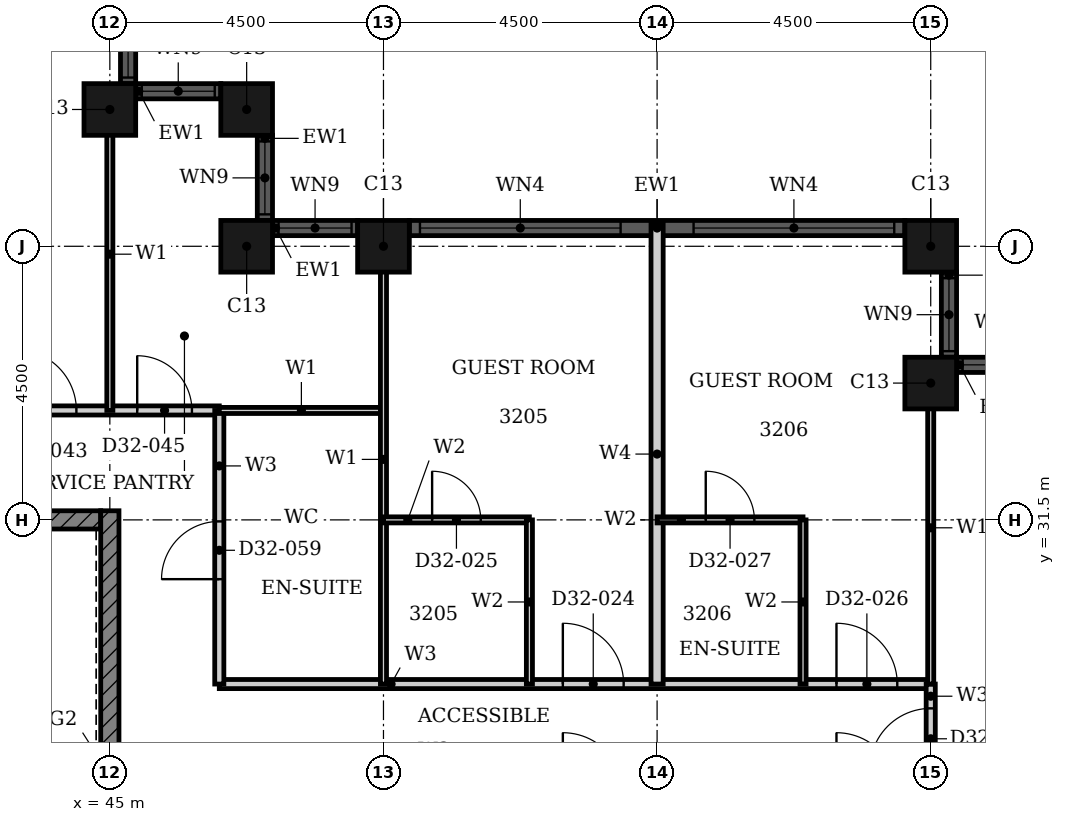
"""IFC4 building model, lengths in metres.
Left out: names, types, materials, properties, quantities, classifications, styles, units other than length and angle.
Written with IfcOpenShell. Run it as: python <this file> out.ifc"""

import sys

from ifc_helpers import new_model, si_unit, direction, frame, frame_2d, origin, origin_2d, place, context, subcontext, project, spatial, rectangle, hollow_rectangle, extrude, element, fill, save


model = new_model("IFC4")
c1 = context("Model", 3, precision=1e-05, world=origin(), true_north=direction((0.0, 1.0)))
c2 = subcontext(c1, "Body", "Model", "MODEL_VIEW")
j1 = project(units=[si_unit("LENGTHUNIT", "METRE"), si_unit("PLANEANGLEUNIT", "RADIAN")], contexts=[c1])
p1 = place(None, origin())
s1 = spatial("IfcSite", under=j1, at=p1, CompositionType="ELEMENT")
p2 = place(p1, origin())
s2 = spatial("IfcBuilding", under=s1, at=p2, CompositionType="ELEMENT")
p3 = place(p2, frame((0.0, 0.0, 129.6)))
s3 = spatial("IfcBuildingStorey", under=s2, at=p3, CompositionType="ELEMENT", Elevation=129.6)
for number, where, z_axis, x_axis in (
    (1, (58.5, 33.75, 0.0), (0.0, 0.0, 1.0), (1.0, 0.0, 0.0)),
    (2, (58.5, 36.0, 0.0), (0.0, 0.0, 1.0), (1.0, 0.0, 0.0)),
    (3, (49.5, 36.0, 0.0), (0.0, 0.0, 1.0), (1.0, 0.0, 0.0)),
    (4, (47.25, 36.0, 0.0), (0.0, 0.0, 1.0), (1.0, 0.0, 0.0)),
    (5, (47.25, 38.25, 0.0), (0.0, 0.0, 1.0), (1.0, 0.0, 0.0)),
    (6, (45.0, 38.25, 0.0), (0.0, 0.0, 1.0), (1.0, 0.0, 0.0)),
):
    element("IfcColumn", number, at=place(p3, frame(where, z_axis=z_axis, x_axis=x_axis)), inside=s3, PredefinedType="COLUMN", context=c2, shape_type="SweptSolid", body=[
        extrude(hollow_rectangle(XDim=0.85, YDim=0.85, WallThickness=0.026, at=origin_2d()), origin(), (0.0, 0.0, 1.0), 3.6),
    ])
p4 = place(p3, frame((60.325, 34.05, 0.0), z_axis=(0.0, 0.0, 1.0), x_axis=(-1.0, 0.0, 0.0)))
e7 = element("IfcWall", 7, at=p4, inside=s3, PredefinedType="SOLIDWALL", context=c2, shape_type="SweptSolid", body=[
    extrude(rectangle(XDim=1.4, YDim=0.25, at=frame_2d((0.7, 0.0))), origin(), (0.0, 0.0, 1.0), 3.6),
])
p5 = place(p4, frame((0.1, 0.0, 0.9)))
e8 = element("IfcOpeningElement", 8, at=p5, cuts=e7, PredefinedType="OPENING", context=c2, shape_type="SweptSolid", body=[
    extrude(rectangle(XDim=1.2, YDim=2.08, at=frame_2d((0.6, 1.04))), frame((0.0, 0.135, 0.0), z_axis=(0.0, -1.0, 0.0), x_axis=(1.0, 0.0, 0.0)), (0.0, 0.0, 1.0), 0.27),
])
p6 = place(p3, frame((58.8, 34.175, 0.0), z_axis=(0.0, 0.0, 1.0), x_axis=(0.0, 1.0, 0.0)))
e9 = element("IfcWall", 9, at=p6, inside=s3, PredefinedType="SOLIDWALL", context=c2, shape_type="SweptSolid", body=[
    extrude(rectangle(XDim=1.4, YDim=0.25, at=frame_2d((0.7, 0.0))), origin(), (0.0, 0.0, 1.0), 3.6),
])
p7 = place(p6, frame((0.1, 0.0, 0.9)))
e10 = element("IfcOpeningElement", 10, at=p7, cuts=e9, PredefinedType="OPENING", context=c2, shape_type="SweptSolid", body=[
    extrude(rectangle(XDim=1.2, YDim=2.08, at=frame_2d((0.6, 1.04))), frame((0.0, 0.135, 0.0), z_axis=(0.0, -1.0, 0.0), x_axis=(1.0, 0.0, 0.0)), (0.0, 0.0, 1.0), 0.27),
])
p8 = place(p3, frame((58.075, 36.3, 0.0), z_axis=(0.0, 0.0, 1.0), x_axis=(-1.0, 0.0, 0.0)))
e11 = element("IfcWall", 11, at=p8, inside=s3, PredefinedType="SOLIDWALL", context=c2, shape_type="SweptSolid", body=[
    extrude(rectangle(XDim=8.15, YDim=0.25, at=frame_2d((4.075, 0.0))), origin(), (0.0, 0.0, 1.0), 3.6),
])
p9 = place(p8, frame((0.175, 0.0, 0.9)))
e12 = element("IfcOpeningElement", 12, at=p9, cuts=e11, PredefinedType="OPENING", context=c2, shape_type="SweptSolid", body=[
    extrude(rectangle(XDim=3.3, YDim=2.08, at=frame_2d((1.65, 1.04))), frame((0.0, 0.135, 0.0), z_axis=(0.0, -1.0, 0.0), x_axis=(1.0, 0.0, 0.0)), (0.0, 0.0, 1.0), 0.27),
])
p10 = place(p8, frame((4.675, 0.0, 0.9)))
e13 = element("IfcOpeningElement", 13, at=p10, cuts=e11, PredefinedType="OPENING", context=c2, shape_type="SweptSolid", body=[
    extrude(rectangle(XDim=3.3, YDim=2.08, at=frame_2d((1.65, 1.04))), frame((0.0, 0.135, 0.0), z_axis=(0.0, -1.0, 0.0), x_axis=(1.0, 0.0, 0.0)), (0.0, 0.0, 1.0), 0.27),
])
p11 = place(p3, frame((49.075, 36.3, 0.0), z_axis=(0.0, 0.0, 1.0), x_axis=(-1.0, 0.0, 0.0)))
e14 = element("IfcWall", 14, at=p11, inside=s3, PredefinedType="SOLIDWALL", context=c2, shape_type="SweptSolid", body=[
    extrude(rectangle(XDim=1.4, YDim=0.25, at=frame_2d((0.7, 0.0))), origin(), (0.0, 0.0, 1.0), 3.6),
])
p12 = place(p11, frame((0.1, 0.0, 0.9)))
e15 = element("IfcOpeningElement", 15, at=p12, cuts=e14, PredefinedType="OPENING", context=c2, shape_type="SweptSolid", body=[
    extrude(rectangle(XDim=1.2, YDim=2.08, at=frame_2d((0.6, 1.04))), frame((0.0, 0.135, 0.0), z_axis=(0.0, -1.0, 0.0), x_axis=(1.0, 0.0, 0.0)), (0.0, 0.0, 1.0), 0.27),
])
p13 = place(p3, frame((47.55, 36.425, 0.0), z_axis=(0.0, 0.0, 1.0), x_axis=(0.0, 1.0, 0.0)))
e16 = element("IfcWall", 16, at=p13, inside=s3, PredefinedType="SOLIDWALL", context=c2, shape_type="SweptSolid", body=[
    extrude(rectangle(XDim=1.4, YDim=0.25, at=frame_2d((0.7, 0.0))), origin(), (0.0, 0.0, 1.0), 3.6),
])
p14 = place(p13, frame((0.1, 0.0, 0.9)))
e17 = element("IfcOpeningElement", 17, at=p14, cuts=e16, PredefinedType="OPENING", context=c2, shape_type="SweptSolid", body=[
    extrude(rectangle(XDim=1.2, YDim=2.08, at=frame_2d((0.6, 1.04))), frame((0.0, 0.135, 0.0), z_axis=(0.0, -1.0, 0.0), x_axis=(1.0, 0.0, 0.0)), (0.0, 0.0, 1.0), 0.27),
])
p15 = place(p3, frame((46.825, 38.55, 0.0), z_axis=(0.0, 0.0, 1.0), x_axis=(-1.0, 0.0, 0.0)))
e18 = element("IfcWall", 18, at=p15, inside=s3, PredefinedType="SOLIDWALL", context=c2, shape_type="SweptSolid", body=[
    extrude(rectangle(XDim=1.4, YDim=0.25, at=frame_2d((0.7, 0.0))), origin(), (0.0, 0.0, 1.0), 3.6),
])
p16 = place(p15, frame((0.1, 0.0, 0.9)))
e19 = element("IfcOpeningElement", 19, at=p16, cuts=e18, PredefinedType="OPENING", context=c2, shape_type="SweptSolid", body=[
    extrude(rectangle(XDim=1.2, YDim=2.08, at=frame_2d((0.6, 1.04))), frame((0.0, 0.135, 0.0), z_axis=(0.0, -1.0, 0.0), x_axis=(1.0, 0.0, 0.0)), (0.0, 0.0, 1.0), 0.27),
])
p17 = place(p3, frame((45.3, 38.675, 0.0), z_axis=(0.0, 0.0, 1.0), x_axis=(0.0, 1.0, 0.0)))
e20 = element("IfcWall", 20, at=p17, inside=s3, PredefinedType="SOLIDWALL", context=c2, shape_type="SweptSolid", body=[
    extrude(rectangle(XDim=1.4, YDim=0.25, at=frame_2d((0.7, 0.0))), origin(), (0.0, 0.0, 1.0), 3.6),
])
p18 = place(p17, frame((0.1, 0.0, 0.9)))
e21 = element("IfcOpeningElement", 21, at=p18, cuts=e20, PredefinedType="OPENING", context=c2, shape_type="SweptSolid", body=[
    extrude(rectangle(XDim=1.2, YDim=2.08, at=frame_2d((0.6, 1.04))), frame((0.0, 0.135, 0.0), z_axis=(0.0, -1.0, 0.0), x_axis=(1.0, 0.0, 0.0)), (0.0, 0.0, 1.0), 0.27),
])
p19 = place(p3, frame((40.625, 31.5, 0.0), z_axis=(0.0, 0.0, 1.0), x_axis=(1.0, 0.0, 0.0)))
e22 = element("IfcWall", 22, at=p19, inside=s3, PredefinedType="SHEAR", context=c2, shape_type="SweptSolid", body=[
    extrude(rectangle(XDim=4.225, YDim=0.3, at=frame_2d((2.113, 0.0))), origin(), (0.0, 0.0, 1.0), 3.3),
])
p20 = place(p3, frame((45.0, 22.35, 0.0), z_axis=(0.0, 0.0, 1.0), x_axis=(0.0, 1.0, 0.0)))
e23 = element("IfcWall", 23, at=p20, inside=s3, PredefinedType="SHEAR", context=c2, shape_type="SweptSolid", body=[
    extrude(rectangle(XDim=9.3, YDim=0.3, at=frame_2d((4.65, 0.0))), origin(), (0.0, 0.0, 1.0), 3.3),
])
p21 = place(p3, frame((46.8, 28.8, 0.0), z_axis=(0.0, 0.0, 1.0), x_axis=(1.0, 0.0, 0.0)))
e24 = element("IfcWall", 24, at=p21, inside=s3, PredefinedType="PARTITIONING", context=c2, shape_type="SweptSolid", body=[
    extrude(rectangle(XDim=11.7, YDim=0.15, at=frame_2d((5.85, 0.0))), origin(), (0.0, 0.0, 1.0), 3.3),
])
p22 = place(p21, frame((5.65, 0.0, 0.0)))
e25 = element("IfcOpeningElement", 25, at=p22, cuts=e24, PredefinedType="OPENING", context=c2, shape_type="SweptSolid", body=[
    extrude(rectangle(XDim=1.0, YDim=2.1, at=frame_2d((0.5, 1.05))), frame((0.0, 0.085, 0.0), z_axis=(0.0, -1.0, 0.0), x_axis=(1.0, 0.0, 0.0)), (0.0, 0.0, 1.0), 0.17),
])
p23 = place(p21, frame((10.15, 0.0, 0.0)))
e26 = element("IfcOpeningElement", 26, at=p23, cuts=e24, PredefinedType="OPENING", context=c2, shape_type="SweptSolid", body=[
    extrude(rectangle(XDim=1.0, YDim=2.1, at=frame_2d((0.5, 1.05))), frame((0.0, 0.085, 0.0), z_axis=(0.0, -1.0, 0.0), x_axis=(1.0, 0.0, 0.0)), (0.0, 0.0, 1.0), 0.17),
])
p24 = place(p3, frame((40.5, 33.3, 0.0), z_axis=(0.0, 0.0, 1.0), x_axis=(1.0, 0.0, 0.0)))
e27 = element("IfcWall", 27, at=p24, inside=s3, PredefinedType="PARTITIONING", context=c2, shape_type="SweptSolid", body=[
    extrude(rectangle(XDim=6.3, YDim=0.15, at=frame_2d((3.15, 0.0))), origin(), (0.0, 0.0, 1.0), 3.3),
])
p25 = place(p24, frame((2.95, 0.0, 0.0)))
e28 = element("IfcOpeningElement", 28, at=p25, cuts=e27, PredefinedType="OPENING", context=c2, shape_type="SweptSolid", body=[
    extrude(rectangle(XDim=1.0, YDim=2.1, at=frame_2d((0.5, 1.05))), frame((0.0, 0.085, 0.0), z_axis=(0.0, -1.0, 0.0), x_axis=(1.0, 0.0, 0.0)), (0.0, 0.0, 1.0), 0.17),
])
p26 = place(p24, frame((4.95, 0.0, 0.0)))
e29 = element("IfcOpeningElement", 29, at=p26, cuts=e27, PredefinedType="OPENING", context=c2, shape_type="SweptSolid", body=[
    extrude(rectangle(XDim=0.9, YDim=2.1, at=frame_2d((0.45, 1.05))), frame((0.0, 0.085, 0.0), z_axis=(0.0, -1.0, 0.0), x_axis=(1.0, 0.0, 0.0)), (0.0, 0.0, 1.0), 0.17),
])
p27 = place(p3, frame((46.8, 28.8, 0.0), z_axis=(0.0, 0.0, 1.0), x_axis=(0.0, 1.0, 0.0)))
e30 = element("IfcWall", 30, at=p27, inside=s3, PredefinedType="PARTITIONING", context=c2, shape_type="SweptSolid", body=[
    extrude(rectangle(XDim=4.5, YDim=0.15, at=frame_2d((2.25, 0.0))), origin(), (0.0, 0.0, 1.0), 3.3),
])
p28 = place(p27, frame((1.725, 0.0, 0.0)))
e31 = element("IfcOpeningElement", 31, at=p28, cuts=e30, PredefinedType="OPENING", context=c2, shape_type="SweptSolid", body=[
    extrude(rectangle(XDim=0.95, YDim=2.1, at=frame_2d((0.475, 1.05))), frame((0.0, 0.085, 0.0), z_axis=(0.0, -1.0, 0.0), x_axis=(1.0, 0.0, 0.0)), (0.0, 0.0, 1.0), 0.17),
])
p29 = place(p3, frame((58.5, 27.0, 0.0), z_axis=(0.0, 0.0, 1.0), x_axis=(0.0, 1.0, 0.0)))
e32 = element("IfcWall", 32, at=p29, inside=s3, PredefinedType="PARTITIONING", context=c2, shape_type="SweptSolid", body=[
    extrude(rectangle(XDim=1.8, YDim=0.15, at=frame_2d((0.9, 0.0))), origin(), (0.0, 0.0, 1.0), 3.3),
])
p30 = place(p29, frame((0.4, 0.0, 0.0)))
e33 = element("IfcOpeningElement", 33, at=p30, cuts=e32, PredefinedType="OPENING", context=c2, shape_type="SweptSolid", body=[
    extrude(rectangle(XDim=1.0, YDim=2.1, at=frame_2d((0.5, 1.05))), frame((0.0, 0.085, 0.0), z_axis=(0.0, -1.0, 0.0), x_axis=(1.0, 0.0, 0.0)), (0.0, 0.0, 1.0), 0.17),
])
p31 = place(p3, frame((46.8, 33.3, 0.0), z_axis=(0.0, 0.0, 1.0), x_axis=(1.0, 0.0, 0.0)))
e34 = element("IfcWall", 34, at=p31, inside=s3, PredefinedType="PARTITIONING", context=c2, shape_type="SweptSolid", body=[
    extrude(rectangle(XDim=2.7, YDim=0.1, at=frame_2d((1.35, 0.0))), origin(), (0.0, 0.0, 1.0), 3.3),
])
p32 = place(p3, frame((45.0, 33.3, 0.0), z_axis=(0.0, 0.0, 1.0), x_axis=(0.0, 1.0, 0.0)))
e35 = element("IfcWall", 35, at=p32, inside=s3, PredefinedType="PARTITIONING", context=c2, shape_type="SweptSolid", body=[
    extrude(rectangle(XDim=5.14, YDim=0.1, at=frame_2d((2.57, 0.0))), origin(), (0.0, 0.0, 1.0), 3.3),
])
p33 = place(p3, frame((49.5, 28.8, 0.0), z_axis=(0.0, 0.0, 1.0), x_axis=(0.0, 1.0, 0.0)))
e36 = element("IfcWall", 36, at=p33, inside=s3, PredefinedType="PARTITIONING", context=c2, shape_type="SweptSolid", body=[
    extrude(rectangle(XDim=7.39, YDim=0.1, at=frame_2d((3.695, 0.0))), origin(), (0.0, 0.0, 1.0), 2.38),
])
p34 = place(p3, frame((58.5, 28.8, 0.0), z_axis=(0.0, 0.0, 1.0), x_axis=(0.0, 1.0, 0.0)))
e37 = element("IfcWall", 37, at=p34, inside=s3, PredefinedType="PARTITIONING", context=c2, shape_type="SweptSolid", body=[
    extrude(rectangle(XDim=5.14, YDim=0.1, at=frame_2d((2.57, 0.0))), origin(), (0.0, 0.0, 1.0), 3.3),
])
p35 = place(p3, frame((54.0, 28.8, 0.0), z_axis=(0.0, 0.0, 1.0), x_axis=(0.0, 1.0, 0.0)))
e38 = element("IfcWall", 38, at=p35, inside=s3, PredefinedType="PARTITIONING", context=c2, shape_type="SweptSolid", body=[
    extrude(rectangle(XDim=7.565, YDim=0.2, at=frame_2d((3.782, 0.0))), origin(), (0.0, 0.0, 1.0), 3.3),
])
p36 = place(p3, frame((49.5, 31.5, 0.0), z_axis=(0.0, 0.0, 1.0), x_axis=(1.0, 0.0, 0.0)))
e39 = element("IfcWall", 39, at=p36, inside=s3, PredefinedType="PARTITIONING", context=c2, shape_type="SweptSolid", body=[
    extrude(rectangle(XDim=2.4, YDim=0.1, at=frame_2d((1.2, 0.0))), origin(), (0.0, 0.0, 1.0), 2.58),
])
p37 = place(p36, frame((0.8, 0.0, 0.0)))
e40 = element("IfcOpeningElement", 40, at=p37, cuts=e39, PredefinedType="OPENING", context=c2, shape_type="SweptSolid", body=[
    extrude(rectangle(XDim=0.8, YDim=2.1, at=frame_2d((0.4, 1.05))), frame((0.0, 0.06, 0.0), z_axis=(0.0, -1.0, 0.0), x_axis=(1.0, 0.0, 0.0)), (0.0, 0.0, 1.0), 0.12),
])
p38 = place(p3, frame((54.0, 31.5, 0.0), z_axis=(0.0, 0.0, 1.0), x_axis=(1.0, 0.0, 0.0)))
e41 = element("IfcWall", 41, at=p38, inside=s3, PredefinedType="PARTITIONING", context=c2, shape_type="SweptSolid", body=[
    extrude(rectangle(XDim=2.4, YDim=0.1, at=frame_2d((1.2, 0.0))), origin(), (0.0, 0.0, 1.0), 2.58),
])
p39 = place(p38, frame((0.8, 0.0, 0.0)))
e42 = element("IfcOpeningElement", 42, at=p39, cuts=e41, PredefinedType="OPENING", context=c2, shape_type="SweptSolid", body=[
    extrude(rectangle(XDim=0.8, YDim=2.1, at=frame_2d((0.4, 1.05))), frame((0.0, 0.06, 0.0), z_axis=(0.0, -1.0, 0.0), x_axis=(1.0, 0.0, 0.0)), (0.0, 0.0, 1.0), 0.12),
])
for number, where, z_axis, x_axis in (
    (43, (51.9, 28.8, 0.0), (0.0, 0.0, 1.0), (0.0, 1.0, 0.0)),
    (44, (56.4, 28.8, 0.0), (0.0, 0.0, 1.0), (0.0, 1.0, 0.0)),
):
    element("IfcWall", number, at=place(p3, frame(where, z_axis=z_axis, x_axis=x_axis)), inside=s3, PredefinedType="PARTITIONING", context=c2, shape_type="SweptSolid", body=[
        extrude(rectangle(XDim=2.7, YDim=0.1, at=frame_2d((1.35, 0.0))), origin(), (0.0, 0.0, 1.0), 3.3),
    ])
p40 = place(p5, origin())
e45 = element("IfcWindow", 45, at=p40, inside=s3, PartitioningType="SINGLE_PANEL", PredefinedType="WINDOW", context=c2, shape_type="SweptSolid", body=[
    extrude(rectangle(XDim=1.2, YDim=2.08, at=frame_2d((0.6, 1.04))), frame((0.0, 0.03, 0.0), z_axis=(0.0, -1.0, 0.0), x_axis=(1.0, 0.0, 0.0)), (0.0, 0.0, 1.0), 0.06),
])
fill(e8, e45)
p41 = place(p7, origin())
e46 = element("IfcWindow", 46, at=p41, inside=s3, PartitioningType="SINGLE_PANEL", PredefinedType="WINDOW", context=c2, shape_type="SweptSolid", body=[
    extrude(rectangle(XDim=1.2, YDim=2.08, at=frame_2d((0.6, 1.04))), frame((0.0, 0.03, 0.0), z_axis=(0.0, -1.0, 0.0), x_axis=(1.0, 0.0, 0.0)), (0.0, 0.0, 1.0), 0.06),
])
fill(e10, e46)
p42 = place(p9, origin())
e47 = element("IfcWindow", 47, at=p42, inside=s3, PartitioningType="SINGLE_PANEL", PredefinedType="WINDOW", context=c2, shape_type="SweptSolid", body=[
    extrude(rectangle(XDim=3.3, YDim=2.08, at=frame_2d((1.65, 1.04))), frame((0.0, 0.03, 0.0), z_axis=(0.0, -1.0, 0.0), x_axis=(1.0, 0.0, 0.0)), (0.0, 0.0, 1.0), 0.06),
])
fill(e12, e47)
p43 = place(p10, origin())
e48 = element("IfcWindow", 48, at=p43, inside=s3, PartitioningType="SINGLE_PANEL", PredefinedType="WINDOW", context=c2, shape_type="SweptSolid", body=[
    extrude(rectangle(XDim=3.3, YDim=2.08, at=frame_2d((1.65, 1.04))), frame((0.0, 0.03, 0.0), z_axis=(0.0, -1.0, 0.0), x_axis=(1.0, 0.0, 0.0)), (0.0, 0.0, 1.0), 0.06),
])
fill(e13, e48)
p44 = place(p12, origin())
e49 = element("IfcWindow", 49, at=p44, inside=s3, PartitioningType="SINGLE_PANEL", PredefinedType="WINDOW", context=c2, shape_type="SweptSolid", body=[
    extrude(rectangle(XDim=1.2, YDim=2.08, at=frame_2d((0.6, 1.04))), frame((0.0, 0.03, 0.0), z_axis=(0.0, -1.0, 0.0), x_axis=(1.0, 0.0, 0.0)), (0.0, 0.0, 1.0), 0.06),
])
fill(e15, e49)
p45 = place(p14, origin())
e50 = element("IfcWindow", 50, at=p45, inside=s3, PartitioningType="SINGLE_PANEL", PredefinedType="WINDOW", context=c2, shape_type="SweptSolid", body=[
    extrude(rectangle(XDim=1.2, YDim=2.08, at=frame_2d((0.6, 1.04))), frame((0.0, 0.03, 0.0), z_axis=(0.0, -1.0, 0.0), x_axis=(1.0, 0.0, 0.0)), (0.0, 0.0, 1.0), 0.06),
])
fill(e17, e50)
p46 = place(p16, origin())
e51 = element("IfcWindow", 51, at=p46, inside=s3, PartitioningType="SINGLE_PANEL", PredefinedType="WINDOW", context=c2, shape_type="SweptSolid", body=[
    extrude(rectangle(XDim=1.2, YDim=2.08, at=frame_2d((0.6, 1.04))), frame((0.0, 0.03, 0.0), z_axis=(0.0, -1.0, 0.0), x_axis=(1.0, 0.0, 0.0)), (0.0, 0.0, 1.0), 0.06),
])
fill(e19, e51)
p47 = place(p18, origin())
e52 = element("IfcWindow", 52, at=p47, inside=s3, PartitioningType="SINGLE_PANEL", PredefinedType="WINDOW", context=c2, shape_type="SweptSolid", body=[
    extrude(rectangle(XDim=1.2, YDim=2.08, at=frame_2d((0.6, 1.04))), frame((0.0, 0.03, 0.0), z_axis=(0.0, -1.0, 0.0), x_axis=(1.0, 0.0, 0.0)), (0.0, 0.0, 1.0), 0.06),
])
fill(e21, e52)
p48 = place(p22, origin())
e53 = element("IfcDoor", 53, at=p48, inside=s3, OperationType="SINGLE_SWING_RIGHT", PredefinedType="DOOR", context=c2, shape_type="SweptSolid", body=[
    extrude(rectangle(XDim=1.0, YDim=2.1, at=frame_2d((0.5, 1.05))), frame((0.0, 0.025, 0.0), z_axis=(0.0, -1.0, 0.0), x_axis=(1.0, 0.0, 0.0)), (0.0, 0.0, 1.0), 0.05),
])
fill(e25, e53)
p49 = place(p37, origin())
e54 = element("IfcDoor", 54, at=p49, inside=s3, OperationType="SINGLE_SWING_LEFT", PredefinedType="DOOR", context=c2, shape_type="SweptSolid", body=[
    extrude(rectangle(XDim=0.8, YDim=2.1, at=frame_2d((0.4, 1.05))), frame((0.0, 0.025, 0.0), z_axis=(0.0, -1.0, 0.0), x_axis=(1.0, 0.0, 0.0)), (0.0, 0.0, 1.0), 0.05),
])
fill(e40, e54)
p50 = place(p23, origin())
e55 = element("IfcDoor", 55, at=p50, inside=s3, OperationType="SINGLE_SWING_RIGHT", PredefinedType="DOOR", context=c2, shape_type="SweptSolid", body=[
    extrude(rectangle(XDim=1.0, YDim=2.1, at=frame_2d((0.5, 1.05))), frame((0.0, 0.025, 0.0), z_axis=(0.0, -1.0, 0.0), x_axis=(1.0, 0.0, 0.0)), (0.0, 0.0, 1.0), 0.05),
])
fill(e26, e55)
p51 = place(p39, origin())
e56 = element("IfcDoor", 56, at=p51, inside=s3, OperationType="SINGLE_SWING_RIGHT", PredefinedType="DOOR", context=c2, shape_type="SweptSolid", body=[
    extrude(rectangle(XDim=0.8, YDim=2.1, at=frame_2d((0.4, 1.05))), frame((0.0, 0.025, 0.0), z_axis=(0.0, -1.0, 0.0), x_axis=(1.0, 0.0, 0.0)), (0.0, 0.0, 1.0), 0.05),
])
fill(e42, e56)
p52 = place(p30, origin())
e57 = element("IfcDoor", 57, at=p52, inside=s3, OperationType="SINGLE_SWING_LEFT", PredefinedType="DOOR", context=c2, shape_type="SweptSolid", body=[
    extrude(rectangle(XDim=1.0, YDim=2.1, at=frame_2d((0.5, 1.05))), frame((0.0, 0.025, 0.0), z_axis=(0.0, -1.0, 0.0), x_axis=(1.0, 0.0, 0.0)), (0.0, 0.0, 1.0), 0.05),
])
fill(e33, e57)
p53 = place(p25, origin())
e58 = element("IfcDoor", 58, at=p53, inside=s3, OperationType="SINGLE_SWING_RIGHT", PredefinedType="DOOR", context=c2, shape_type="SweptSolid", body=[
    extrude(rectangle(XDim=1.0, YDim=2.1, at=frame_2d((0.5, 1.05))), frame((0.0, 0.025, 0.0), z_axis=(0.0, -1.0, 0.0), x_axis=(1.0, 0.0, 0.0)), (0.0, 0.0, 1.0), 0.05),
])
fill(e28, e58)
p54 = place(p26, origin())
e59 = element("IfcDoor", 59, at=p54, inside=s3, OperationType="SINGLE_SWING_RIGHT", PredefinedType="DOOR", context=c2, shape_type="SweptSolid", body=[
    extrude(rectangle(XDim=0.9, YDim=2.1, at=frame_2d((0.45, 1.05))), frame((0.0, 0.025, 0.0), z_axis=(0.0, -1.0, 0.0), x_axis=(1.0, 0.0, 0.0)), (0.0, 0.0, 1.0), 0.05),
])
fill(e29, e59)
p55 = place(p28, origin())
e60 = element("IfcDoor", 60, at=p55, inside=s3, OperationType="SINGLE_SWING_LEFT", PredefinedType="DOOR", context=c2, shape_type="SweptSolid", body=[
    extrude(rectangle(XDim=0.95, YDim=2.1, at=frame_2d((0.475, 1.05))), frame((0.0, 0.025, 0.0), z_axis=(0.0, -1.0, 0.0), x_axis=(1.0, 0.0, 0.0)), (0.0, 0.0, 1.0), 0.05),
])
fill(e31, e60)
save(model, sys.argv[1])
